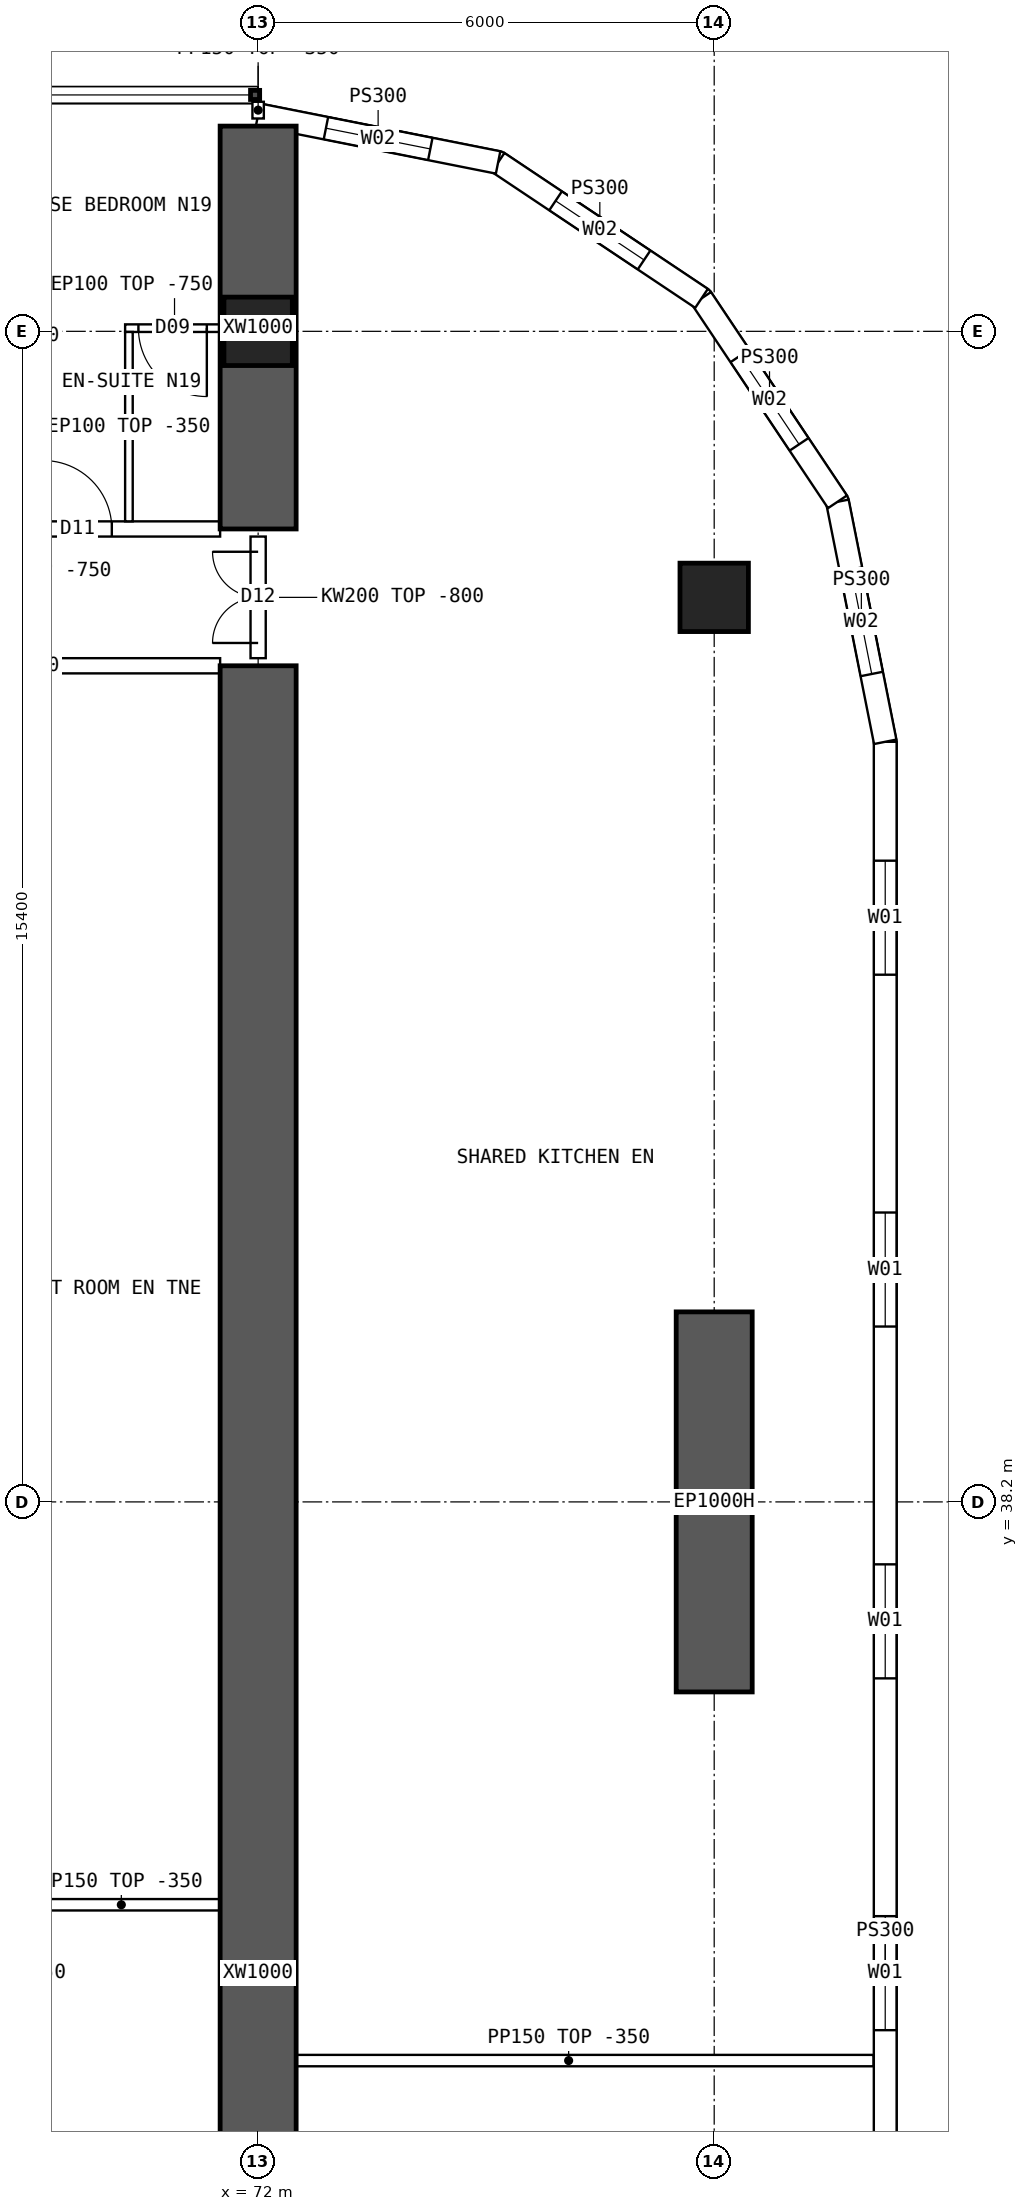
"""IFC4 building model, lengths in metres.
Left out: names, types, materials, properties, quantities, classifications, styles, units other than length and angle.
Written with IfcOpenShell. Run it as: python <this file> out.ifc"""

import sys

from ifc_helpers import new_model, si_unit, direction, frame, frame_2d, origin, origin_2d, place, context, subcontext, project, spatial, polyline, rectangle, hollow_rectangle, outline, extrude, element, fill, save


model = new_model("IFC4")
c1 = context("Model", 3, precision=1e-05, world=origin(), true_north=direction((0.0, 1.0)))
c2 = subcontext(c1, "Body", "Model", "MODEL_VIEW")
j1 = project(units=[si_unit("LENGTHUNIT", "METRE"), si_unit("PLANEANGLEUNIT", "RADIAN")], contexts=[c1])
p1 = place(None, origin())
s1 = spatial("IfcSite", under=j1, at=p1, CompositionType="ELEMENT")
p2 = place(p1, origin())
s2 = spatial("IfcBuilding", under=s1, at=p2, CompositionType="ELEMENT")
p3 = place(p2, frame((0.0, 0.0, 65.2)))
s3 = spatial("IfcBuildingStorey", under=s2, at=p3, CompositionType="ELEMENT", Elevation=65.2)
for number, where, z_axis, x_axis in (
    (1, (72.0, 53.6, 0.0), (0.0, 0.0, 1.0), (1.0, 0.0, 0.0)),
    (2, (78.0, 50.1, 0.0), (0.0, 0.0, 1.0), (1.0, 0.0, 0.0)),
):
    element("IfcColumn", number, at=place(p3, frame(where, z_axis=z_axis, x_axis=x_axis)), inside=s3, PredefinedType="COLUMN", context=c2, shape_type="SweptSolid", body=[
        extrude(hollow_rectangle(XDim=0.9, YDim=0.9, WallThickness=0.09, at=origin_2d()), origin(), (0.0, 0.0, 1.0), 3.75),
    ])
p4 = place(p3, frame((78.0, 35.7, 0.0), z_axis=(0.0, 0.0, 1.0), x_axis=(0.0, 1.0, 0.0)))
e3 = element("IfcWall", 3, at=p4, inside=s3, PredefinedType="SHEAR", context=c2, shape_type="SweptSolid", body=[
    extrude(rectangle(XDim=5.0, YDim=1.0, at=frame_2d((2.5, 0.0))), origin(), (0.0, 0.0, 1.0), 3.75),
])
p5 = place(p3, frame((72.0, 51.0, 0.0), z_axis=(0.0, 0.0, 1.0), x_axis=(0.0, 1.0, 0.0)))
e4 = element("IfcWall", 4, at=p5, inside=s3, PredefinedType="SHEAR", context=c2, shape_type="SweptSolid", body=[
    extrude(rectangle(XDim=5.3, YDim=1.0, at=frame_2d((2.65, 0.0))), origin(), (0.0, 0.0, 1.0), 3.75),
])
p6 = place(p3, frame((72.0, 14.8, 0.0), z_axis=(0.0, 0.0, 1.0), x_axis=(0.0, 1.0, 0.0)))
e5 = element("IfcWall", 5, at=p6, inside=s3, PredefinedType="SHEAR", context=c2, shape_type="SweptSolid", body=[
    extrude(rectangle(XDim=34.4, YDim=1.0, at=frame_2d((17.2, 0.0))), origin(), (0.0, 0.0, 1.0), 3.75),
])
p7 = place(p3, frame((80.25, 15.8, 0.0), z_axis=(0.0, 0.0, 1.0), x_axis=(0.0, 1.0, 0.0)))
e6 = element("IfcWall", 6, at=p7, inside=s3, PredefinedType="SOLIDWALL", context=c2, shape_type="SweptSolid", body=[
    extrude(outline(polyline([(-0.015, -0.15), (32.415, -0.15), (32.385, 0.15), (0.015, 0.15), (-0.015, -0.15)])), origin(), (0.0, 0.0, 1.0), 3.4),
])
p8 = place(p7, frame((1.564, 0.0, 0.9)))
e7 = element("IfcOpeningElement", 7, at=p8, cuts=e6, PredefinedType="OPENING", context=c2, shape_type="SweptSolid", body=[
    extrude(rectangle(XDim=1.5, YDim=2.0, at=frame_2d((0.75, 1.0))), frame((0.0, 0.16, 0.0), z_axis=(0.0, -1.0, 0.0), x_axis=(1.0, 0.0, 0.0)), (0.0, 0.0, 1.0), 0.32),
])
p9 = place(p7, frame((6.193, 0.0, 0.9)))
e8 = element("IfcOpeningElement", 8, at=p9, cuts=e6, PredefinedType="OPENING", context=c2, shape_type="SweptSolid", body=[
    extrude(rectangle(XDim=1.5, YDim=2.0, at=frame_2d((0.75, 1.0))), frame((0.0, 0.16, 0.0), z_axis=(0.0, -1.0, 0.0), x_axis=(1.0, 0.0, 0.0)), (0.0, 0.0, 1.0), 0.32),
])
p10 = place(p7, frame((10.822, 0.0, 0.9)))
e9 = element("IfcOpeningElement", 9, at=p10, cuts=e6, PredefinedType="OPENING", context=c2, shape_type="SweptSolid", body=[
    extrude(rectangle(XDim=1.5, YDim=2.0, at=frame_2d((0.75, 1.0))), frame((0.0, 0.16, 0.0), z_axis=(0.0, -1.0, 0.0), x_axis=(1.0, 0.0, 0.0)), (0.0, 0.0, 1.0), 0.32),
])
p11 = place(p7, frame((15.45, 0.0, 0.9)))
e10 = element("IfcOpeningElement", 10, at=p11, cuts=e6, PredefinedType="OPENING", context=c2, shape_type="SweptSolid", body=[
    extrude(rectangle(XDim=1.5, YDim=2.0, at=frame_2d((0.75, 1.0))), frame((0.0, 0.16, 0.0), z_axis=(0.0, -1.0, 0.0), x_axis=(1.0, 0.0, 0.0)), (0.0, 0.0, 1.0), 0.32),
])
p12 = place(p7, frame((20.079, 0.0, 0.9)))
e11 = element("IfcOpeningElement", 11, at=p12, cuts=e6, PredefinedType="OPENING", context=c2, shape_type="SweptSolid", body=[
    extrude(rectangle(XDim=1.5, YDim=2.0, at=frame_2d((0.75, 1.0))), frame((0.0, 0.16, 0.0), z_axis=(0.0, -1.0, 0.0), x_axis=(1.0, 0.0, 0.0)), (0.0, 0.0, 1.0), 0.32),
])
p13 = place(p7, frame((24.707, 0.0, 0.9)))
e12 = element("IfcOpeningElement", 12, at=p13, cuts=e6, PredefinedType="OPENING", context=c2, shape_type="SweptSolid", body=[
    extrude(rectangle(XDim=1.5, YDim=2.0, at=frame_2d((0.75, 1.0))), frame((0.0, 0.16, 0.0), z_axis=(0.0, -1.0, 0.0), x_axis=(1.0, 0.0, 0.0)), (0.0, 0.0, 1.0), 0.32),
])
p14 = place(p7, frame((29.336, 0.0, 0.9)))
e13 = element("IfcOpeningElement", 13, at=p14, cuts=e6, PredefinedType="OPENING", context=c2, shape_type="SweptSolid", body=[
    extrude(rectangle(XDim=1.5, YDim=2.0, at=frame_2d((0.75, 1.0))), frame((0.0, 0.16, 0.0), z_axis=(0.0, -1.0, 0.0), x_axis=(1.0, 0.0, 0.0)), (0.0, 0.0, 1.0), 0.32),
])
p15 = place(p3, frame((80.25, 48.2, 0.0), z_axis=(0.0, 0.0, 1.0), x_axis=(-0.195065901187, 0.980790137692, 0.0)))
e14 = element("IfcWall", 14, at=p15, inside=s3, PredefinedType="SOLIDWALL", context=c2, shape_type="SweptSolid", body=[
    extrude(outline(polyline([(-0.015, -0.15), (3.249, -0.15), (3.189, 0.15), (0.015, 0.15), (-0.015, -0.15)])), origin(), (0.0, 0.0, 1.0), 3.4),
])
p16 = place(p15, frame((0.909, 0.0, 0.9)))
e15 = element("IfcOpeningElement", 15, at=p16, cuts=e14, PredefinedType="OPENING", context=c2, shape_type="SweptSolid", body=[
    extrude(rectangle(XDim=1.4, YDim=1.8, at=frame_2d((0.7, 0.9))), frame((0.0, 0.16, 0.0), z_axis=(0.0, -1.0, 0.0), x_axis=(1.0, 0.0, 0.0)), (0.0, 0.0, 1.0), 0.32),
])
p17 = place(p3, frame((79.622, 51.357, 0.0), z_axis=(0.0, 0.0, 1.0), x_axis=(-0.555609954424, 0.831443069936, 0.0)))
e16 = element("IfcWall", 16, at=p17, inside=s3, PredefinedType="SOLIDWALL", context=c2, shape_type="SweptSolid", body=[
    extrude(outline(polyline([(-0.03, -0.15), (3.249, -0.15), (3.189, 0.15), (0.03, 0.15), (-0.03, -0.15)])), origin(), (0.0, 0.0, 1.0), 3.4),
])
p18 = place(p17, frame((0.909, 0.0, 0.9)))
e17 = element("IfcOpeningElement", 17, at=p18, cuts=e16, PredefinedType="OPENING", context=c2, shape_type="SweptSolid", body=[
    extrude(rectangle(XDim=1.4, YDim=1.8, at=frame_2d((0.7, 0.9))), frame((0.0, 0.16, 0.0), z_axis=(0.0, -1.0, 0.0), x_axis=(1.0, 0.0, 0.0)), (0.0, 0.0, 1.0), 0.32),
])
p19 = place(p3, frame((77.833, 54.034, 0.0), z_axis=(0.0, 0.0, 1.0), x_axis=(-0.831478105043, 0.555557522525, 0.0)))
e18 = element("IfcWall", 18, at=p19, inside=s3, PredefinedType="SOLIDWALL", context=c2, shape_type="SweptSolid", body=[
    extrude(outline(polyline([(-0.03, -0.15), (3.249, -0.15), (3.189, 0.15), (0.03, 0.15), (-0.03, -0.15)])), origin(), (0.0, 0.0, 1.0), 3.4),
])
p20 = place(p19, frame((0.909, 0.0, 0.9)))
e19 = element("IfcOpeningElement", 19, at=p20, cuts=e18, PredefinedType="OPENING", context=c2, shape_type="SweptSolid", body=[
    extrude(rectangle(XDim=1.4, YDim=1.8, at=frame_2d((0.7, 0.9))), frame((0.0, 0.16, 0.0), z_axis=(0.0, -1.0, 0.0), x_axis=(1.0, 0.0, 0.0)), (0.0, 0.0, 1.0), 0.32),
])
p21 = place(p3, frame((75.157, 55.822, 0.0), z_axis=(0.0, 0.0, 1.0), x_axis=(-0.980787251524, 0.195080412259, 0.0)))
e20 = element("IfcWall", 20, at=p21, inside=s3, PredefinedType="SOLIDWALL", context=c2, shape_type="SweptSolid", body=[
    extrude(outline(polyline([(-0.03, -0.15), (3.249, -0.15), (3.189, 0.15), (0.03, 0.15), (-0.03, -0.15)])), origin(), (0.0, 0.0, 1.0), 3.4),
])
p22 = place(p21, frame((0.909, 0.0, 0.9)))
e21 = element("IfcOpeningElement", 21, at=p22, cuts=e20, PredefinedType="OPENING", context=c2, shape_type="SweptSolid", body=[
    extrude(rectangle(XDim=1.4, YDim=1.8, at=frame_2d((0.7, 0.9))), frame((0.0, 0.16, 0.0), z_axis=(0.0, -1.0, 0.0), x_axis=(1.0, 0.0, 0.0)), (0.0, 0.0, 1.0), 0.32),
])
p23 = place(p3, frame((66.5, 51.0, 0.0), z_axis=(0.0, 0.0, 1.0), x_axis=(1.0, 0.0, 0.0)))
e22 = element("IfcWall", 22, at=p23, inside=s3, PredefinedType="SOLIDWALL", context=c2, shape_type="SweptSolid", body=[
    extrude(outline(polyline([(0.0, 0.0), (5.0, 0.0), (5.0, 3.0), (0.0, 3.0), (0.0, 0.0)])), frame((0.0, 0.1, 0.0), z_axis=(0.0, -1.0, 0.0), x_axis=(1.0, 0.0, 0.0)), (0.0, 0.0, 1.0), 0.2),
])
p24 = place(p23, frame((1.3, 0.0, 0.0)))
e23 = element("IfcOpeningElement", 23, at=p24, cuts=e22, PredefinedType="OPENING", context=c2, shape_type="SweptSolid", body=[
    extrude(rectangle(XDim=0.9, YDim=2.1, at=frame_2d((0.45, 1.05))), frame((0.0, 0.11, 0.0), z_axis=(0.0, -1.0, 0.0), x_axis=(1.0, 0.0, 0.0)), (0.0, 0.0, 1.0), 0.22),
])
p25 = place(p23, frame((2.675, 0.0, 0.0)))
e24 = element("IfcOpeningElement", 24, at=p25, cuts=e22, PredefinedType="OPENING", context=c2, shape_type="SweptSolid", body=[
    extrude(rectangle(XDim=0.9, YDim=2.1, at=frame_2d((0.45, 1.05))), frame((0.0, 0.11, 0.0), z_axis=(0.0, -1.0, 0.0), x_axis=(1.0, 0.0, 0.0)), (0.0, 0.0, 1.0), 0.22),
])
p26 = place(p3, frame((66.5, 49.2, 0.0), z_axis=(0.0, 0.0, 1.0), x_axis=(1.0, 0.0, 0.0)))
e25 = element("IfcWall", 25, at=p26, inside=s3, PredefinedType="SOLIDWALL", context=c2, shape_type="SweptSolid", body=[
    extrude(rectangle(XDim=5.0, YDim=0.2, at=frame_2d((2.5, 0.0))), origin(), (0.0, 0.0, 1.0), 3.4),
])
p27 = place(p26, frame((0.2, 0.0, 0.0)))
e26 = element("IfcOpeningElement", 26, at=p27, cuts=e25, PredefinedType="OPENING", context=c2, shape_type="SweptSolid", body=[
    extrude(rectangle(XDim=1.6, YDim=2.1, at=frame_2d((0.8, 1.05))), frame((0.0, 0.11, 0.0), z_axis=(0.0, -1.0, 0.0), x_axis=(1.0, 0.0, 0.0)), (0.0, 0.0, 1.0), 0.22),
])
p28 = place(p3, frame((70.25, 53.642, 0.0), z_axis=(0.0, 0.0, 1.0), x_axis=(1.0, 0.0, 0.0)))
e27 = element("IfcWall", 27, at=p28, inside=s3, PredefinedType="PARTITIONING", context=c2, shape_type="SweptSolid", body=[
    extrude(outline(polyline([(0.0, 0.0), (1.3, 0.0), (1.3, 3.0), (0.0, 3.0), (0.0, 0.0)])), frame((0.0, 0.05, 0.0), z_axis=(0.0, -1.0, 0.0), x_axis=(1.0, 0.0, 0.0)), (0.0, 0.0, 1.0), 0.1),
])
p29 = place(p28, frame((0.175, 0.0, 0.0)))
e28 = element("IfcOpeningElement", 28, at=p29, cuts=e27, PredefinedType="OPENING", context=c2, shape_type="SweptSolid", body=[
    extrude(rectangle(XDim=0.9, YDim=2.1, at=frame_2d((0.45, 1.05))), frame((0.0, 0.06, 0.0), z_axis=(0.0, -1.0, 0.0), x_axis=(1.0, 0.0, 0.0)), (0.0, 0.0, 1.0), 0.12),
])
p30 = place(p3, frame((70.3, 53.592, 0.0), z_axis=(0.0, 0.0, 1.0), x_axis=(0.0, -1.0, 0.0)))
e29 = element("IfcWall", 29, at=p30, inside=s3, PredefinedType="PARTITIONING", context=c2, shape_type="SweptSolid", body=[
    extrude(outline(polyline([(0.0, 0.0), (2.492, 0.0), (2.492, 3.0), (2.444, 3.0), (2.442, 3.4), (0.194, 3.4), (0.192, 3.0), (0.0, 3.0), (0.0, 0.0)])), frame((0.0, 0.05, 0.0), z_axis=(0.0, -1.0, 0.0), x_axis=(1.0, 0.0, 0.0)), (0.0, 0.0, 1.0), 0.1),
])
p31 = place(p3, frame((68.4, 32.9, 0.0), z_axis=(0.0, 0.0, 1.0), x_axis=(1.0, 0.0, 0.0)))
e30 = element("IfcWall", 30, at=p31, inside=s3, PredefinedType="PARTITIONING", context=c2, shape_type="SweptSolid", body=[
    extrude(rectangle(XDim=3.6, YDim=0.15, at=frame_2d((1.8, 0.0))), origin(), (0.0, 0.0, 1.0), 3.4),
])
p32 = place(p3, frame((72.075, 30.85, 0.0), z_axis=(0.0, 0.0, 1.0), x_axis=(1.0, 0.0, 0.0)))
e31 = element("IfcWall", 31, at=p32, inside=s3, PredefinedType="PARTITIONING", context=c2, shape_type="SweptSolid", body=[
    extrude(outline(polyline([(0.0, 0.0), (8.02, 0.0), (8.02, 3.4), (6.227, 3.4), (6.225, 2.95), (5.627, 2.95), (5.625, 3.4), (0.0, 3.4), (0.0, 0.0)])), frame((0.0, 0.075, 0.0), z_axis=(0.0, -1.0, 0.0), x_axis=(1.0, 0.0, 0.0)), (0.0, 0.0, 1.0), 0.15),
])
p33 = place(p3, frame((72.0, 49.3, 0.0), z_axis=(0.0, 0.0, 1.0), x_axis=(0.0, 1.0, 0.0)))
e32 = element("IfcWall", 32, at=p33, inside=s3, PredefinedType="SOLIDWALL", context=c2, shape_type="SweptSolid", body=[
    extrude(outline(polyline([(0.0, 0.0), (1.6, 0.0), (1.6, 2.95), (0.0, 2.95), (0.0, 0.0)])), frame((0.0, 0.1, 0.0), z_axis=(0.0, -1.0, 0.0), x_axis=(1.0, 0.0, 0.0)), (0.0, 0.0, 1.0), 0.2),
])
p34 = place(p33, frame((0.2, 0.0, 0.0)))
e33 = element("IfcOpeningElement", 33, at=p34, cuts=e32, PredefinedType="OPENING", context=c2, shape_type="SweptSolid", body=[
    extrude(rectangle(XDim=1.2, YDim=2.1, at=frame_2d((0.6, 1.05))), frame((0.0, 0.11, 0.0), z_axis=(0.0, -1.0, 0.0), x_axis=(1.0, 0.0, 0.0)), (0.0, 0.0, 1.0), 0.22),
])
p35 = place(p3, frame((72.0, 56.4, 0.0), z_axis=(0.0, 0.0, 1.0), x_axis=(0.0, 1.0, 0.0)))
e34 = element("IfcWall", 34, at=p35, inside=s3, PredefinedType="PARTITIONING", context=c2, shape_type="SweptSolid", body=[
    extrude(rectangle(XDim=0.22, YDim=0.15, at=frame_2d((0.11, 0.0))), origin(), (0.0, 0.0, 1.0), 3.4),
])
p36 = place(p11, origin())
e35 = element("IfcWindow", 35, at=p36, inside=s3, PartitioningType="SINGLE_PANEL", PredefinedType="WINDOW", context=c2, shape_type="SweptSolid", body=[
    extrude(rectangle(XDim=1.5, YDim=2.0, at=frame_2d((0.75, 1.0))), frame((0.0, 0.03, 0.0), z_axis=(0.0, -1.0, 0.0), x_axis=(1.0, 0.0, 0.0)), (0.0, 0.0, 1.0), 0.06),
])
fill(e10, e35)
p37 = place(p12, origin())
e36 = element("IfcWindow", 36, at=p37, inside=s3, PartitioningType="SINGLE_PANEL", PredefinedType="WINDOW", context=c2, shape_type="SweptSolid", body=[
    extrude(rectangle(XDim=1.5, YDim=2.0, at=frame_2d((0.75, 1.0))), frame((0.0, 0.03, 0.0), z_axis=(0.0, -1.0, 0.0), x_axis=(1.0, 0.0, 0.0)), (0.0, 0.0, 1.0), 0.06),
])
fill(e11, e36)
p38 = place(p13, origin())
e37 = element("IfcWindow", 37, at=p38, inside=s3, PartitioningType="SINGLE_PANEL", PredefinedType="WINDOW", context=c2, shape_type="SweptSolid", body=[
    extrude(rectangle(XDim=1.5, YDim=2.0, at=frame_2d((0.75, 1.0))), frame((0.0, 0.03, 0.0), z_axis=(0.0, -1.0, 0.0), x_axis=(1.0, 0.0, 0.0)), (0.0, 0.0, 1.0), 0.06),
])
fill(e12, e37)
p39 = place(p14, origin())
e38 = element("IfcWindow", 38, at=p39, inside=s3, PartitioningType="SINGLE_PANEL", PredefinedType="WINDOW", context=c2, shape_type="SweptSolid", body=[
    extrude(rectangle(XDim=1.5, YDim=2.0, at=frame_2d((0.75, 1.0))), frame((0.0, 0.03, 0.0), z_axis=(0.0, -1.0, 0.0), x_axis=(1.0, 0.0, 0.0)), (0.0, 0.0, 1.0), 0.06),
])
fill(e13, e38)
p40 = place(p16, origin())
e39 = element("IfcWindow", 39, at=p40, inside=s3, PartitioningType="SINGLE_PANEL", PredefinedType="WINDOW", context=c2, shape_type="SweptSolid", body=[
    extrude(rectangle(XDim=1.4, YDim=1.8, at=frame_2d((0.7, 0.9))), frame((0.0, 0.03, 0.0), z_axis=(0.0, -1.0, 0.0), x_axis=(1.0, 0.0, 0.0)), (0.0, 0.0, 1.0), 0.06),
])
fill(e15, e39)
p41 = place(p18, origin())
e40 = element("IfcWindow", 40, at=p41, inside=s3, PartitioningType="SINGLE_PANEL", PredefinedType="WINDOW", context=c2, shape_type="SweptSolid", body=[
    extrude(rectangle(XDim=1.4, YDim=1.8, at=frame_2d((0.7, 0.9))), frame((0.0, 0.03, 0.0), z_axis=(0.0, -1.0, 0.0), x_axis=(1.0, 0.0, 0.0)), (0.0, 0.0, 1.0), 0.06),
])
fill(e17, e40)
p42 = place(p20, origin())
e41 = element("IfcWindow", 41, at=p42, inside=s3, PartitioningType="SINGLE_PANEL", PredefinedType="WINDOW", context=c2, shape_type="SweptSolid", body=[
    extrude(rectangle(XDim=1.4, YDim=1.8, at=frame_2d((0.7, 0.9))), frame((0.0, 0.03, 0.0), z_axis=(0.0, -1.0, 0.0), x_axis=(1.0, 0.0, 0.0)), (0.0, 0.0, 1.0), 0.06),
])
fill(e19, e41)
p43 = place(p22, origin())
e42 = element("IfcWindow", 42, at=p43, inside=s3, PartitioningType="SINGLE_PANEL", PredefinedType="WINDOW", context=c2, shape_type="SweptSolid", body=[
    extrude(rectangle(XDim=1.4, YDim=1.8, at=frame_2d((0.7, 0.9))), frame((0.0, 0.03, 0.0), z_axis=(0.0, -1.0, 0.0), x_axis=(1.0, 0.0, 0.0)), (0.0, 0.0, 1.0), 0.06),
])
fill(e21, e42)
p44 = place(p29, origin())
e43 = element("IfcDoor", 43, at=p44, inside=s3, OperationType="SINGLE_SWING_RIGHT", PredefinedType="DOOR", context=c2, shape_type="SweptSolid", body=[
    extrude(rectangle(XDim=0.9, YDim=2.1, at=frame_2d((0.45, 1.05))), frame((0.0, 0.025, 0.0), z_axis=(0.0, -1.0, 0.0), x_axis=(1.0, 0.0, 0.0)), (0.0, 0.0, 1.0), 0.05),
])
fill(e28, e43)
p45 = place(p25, origin())
e44 = element("IfcDoor", 44, at=p45, inside=s3, OperationType="SINGLE_SWING_LEFT", PredefinedType="DOOR", context=c2, shape_type="SweptSolid", body=[
    extrude(rectangle(XDim=0.9, YDim=2.1, at=frame_2d((0.45, 1.05))), frame((0.0, 0.025, 0.0), z_axis=(0.0, -1.0, 0.0), x_axis=(1.0, 0.0, 0.0)), (0.0, 0.0, 1.0), 0.05),
])
fill(e24, e44)
p46 = place(p34, origin())
e45 = element("IfcDoor", 45, at=p46, inside=s3, OperationType="DOUBLE_DOOR_SINGLE_SWING", PredefinedType="DOOR", context=c2, shape_type="SweptSolid", body=[
    extrude(rectangle(XDim=1.2, YDim=2.1, at=frame_2d((0.6, 1.05))), frame((0.0, 0.025, 0.0), z_axis=(0.0, -1.0, 0.0), x_axis=(1.0, 0.0, 0.0)), (0.0, 0.0, 1.0), 0.05),
])
fill(e33, e45)
save(model, sys.argv[1])
